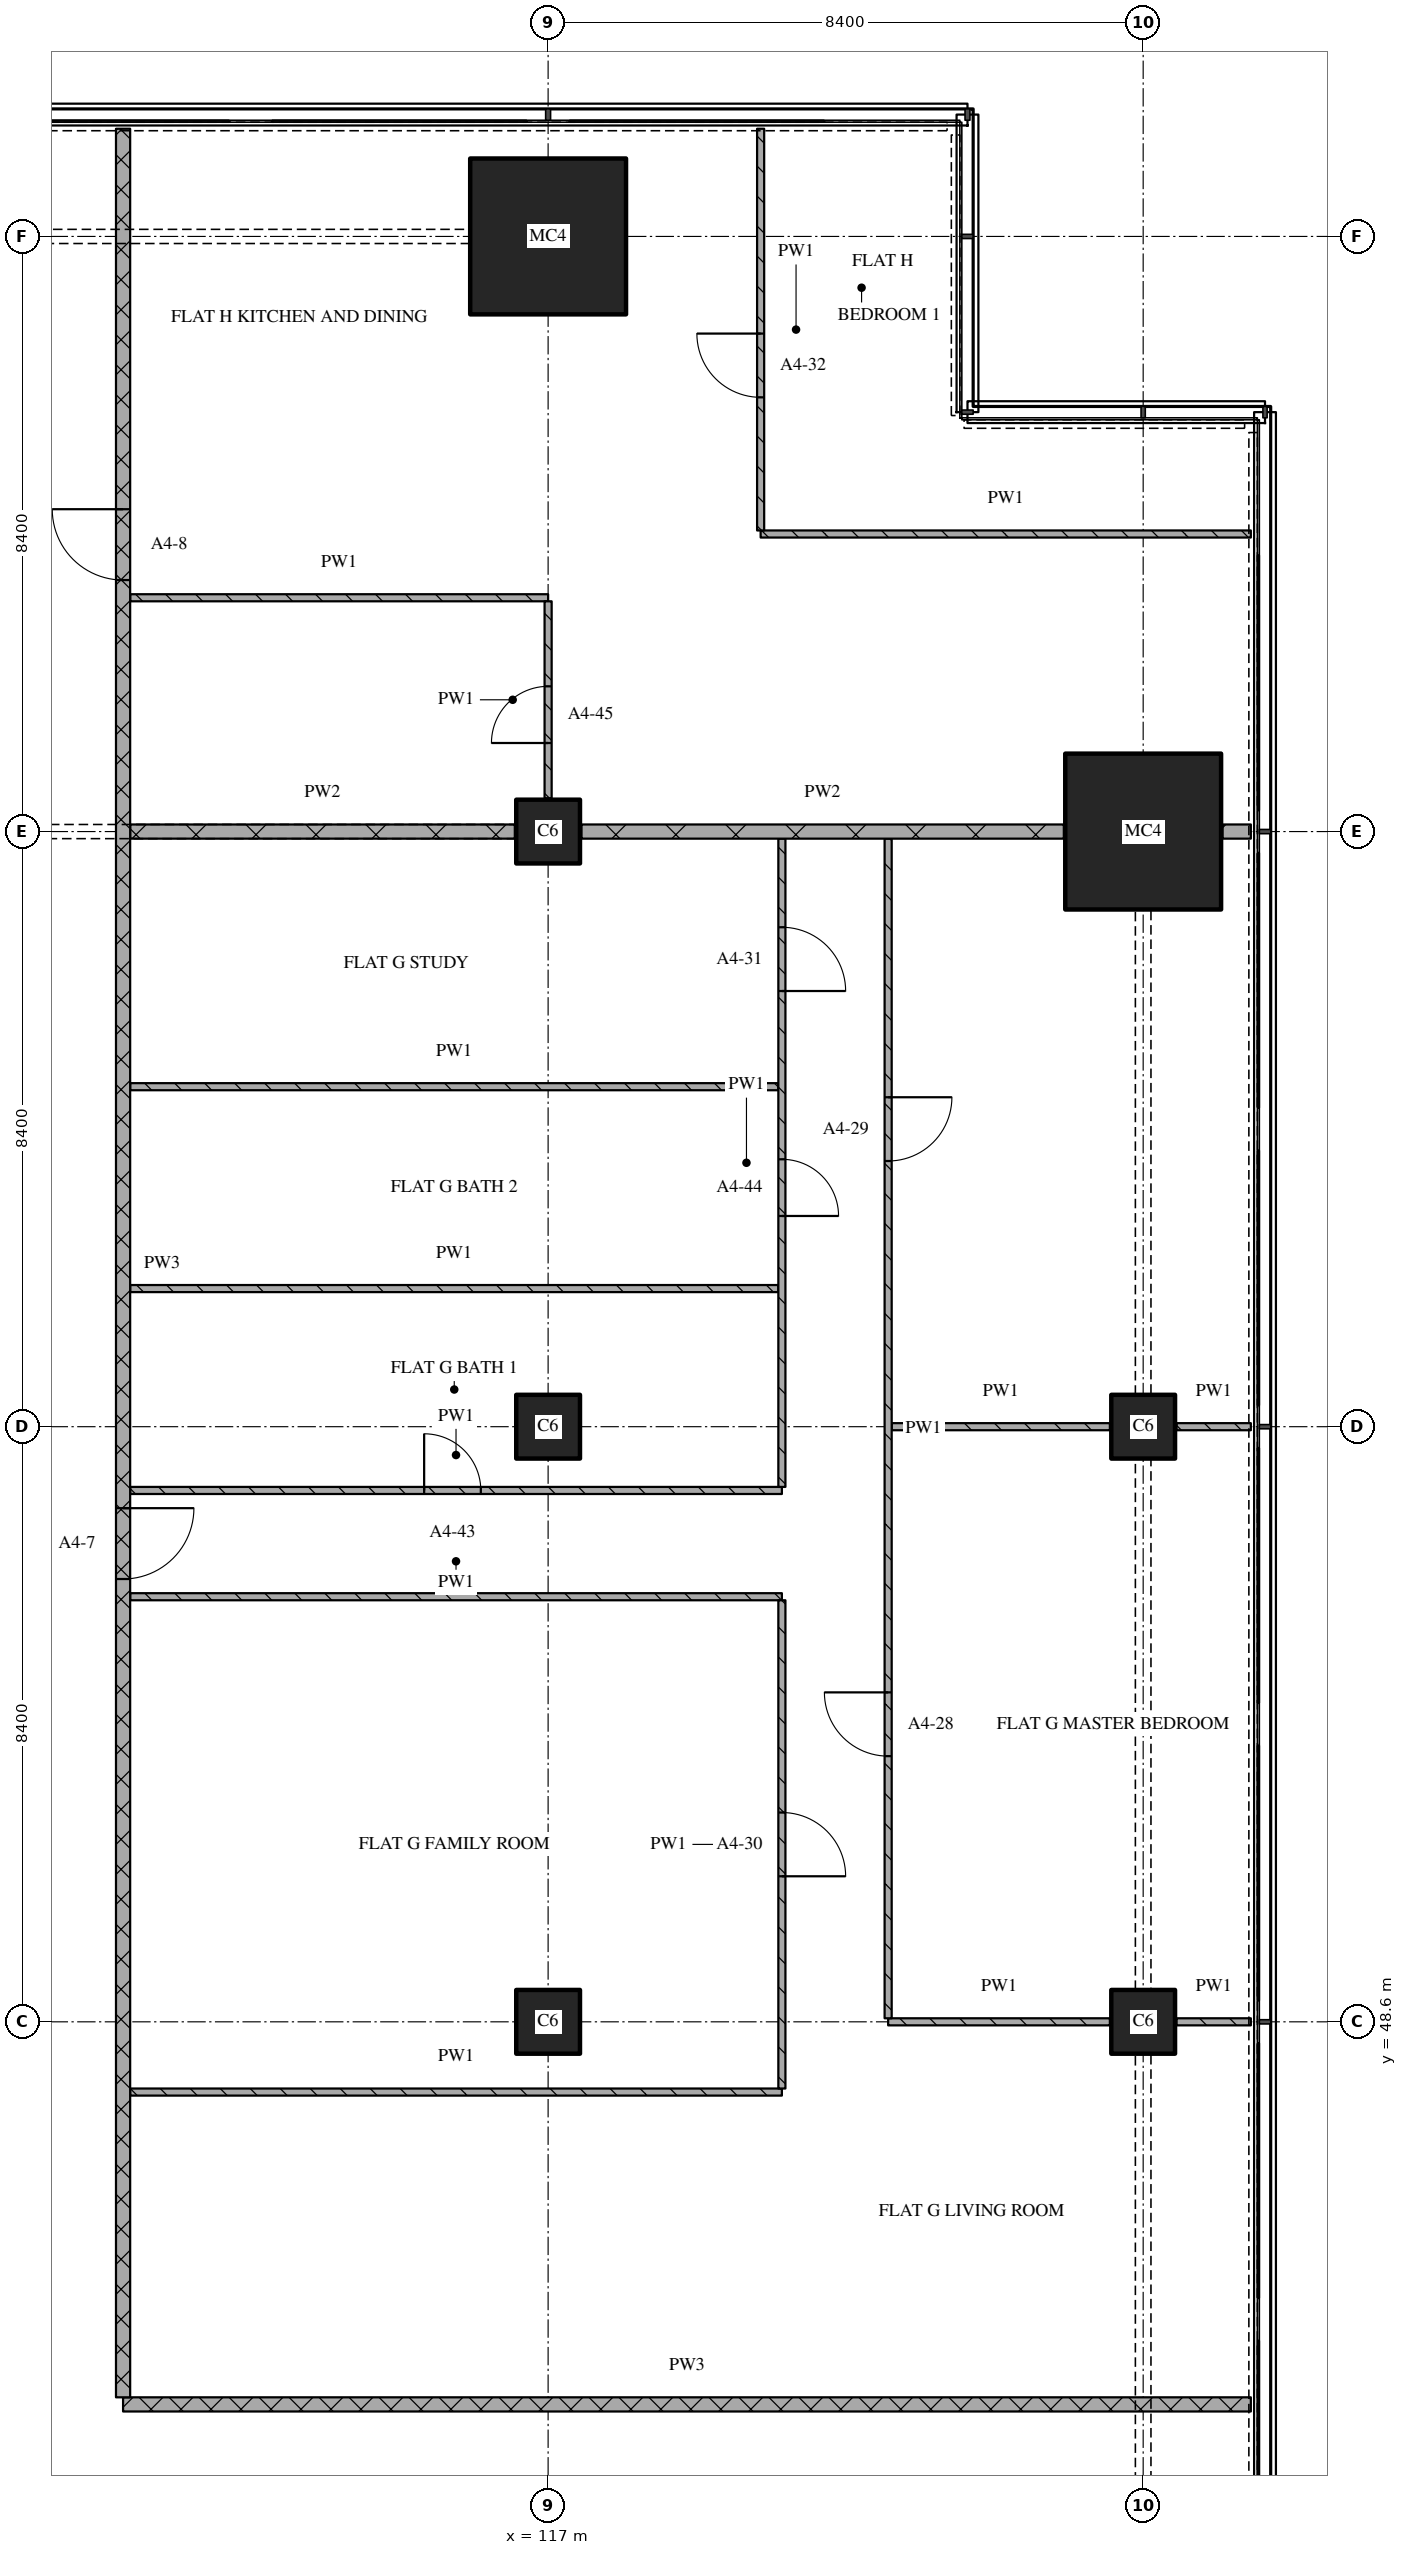
"""IFC4 building model, lengths in metres.
Left out: names, types, materials, properties, quantities, classifications, styles, units other than length and angle.
Written with IfcOpenShell. Run it as: python <this file> out.ifc"""

import sys

from ifc_helpers import new_model, si_unit, direction, frame, frame_2d, origin, origin_2d, place, context, subcontext, project, spatial, rectangle, extrude, element, fill, save


model = new_model("IFC4")
c1 = context("Model", 3, precision=1e-05, world=origin(), true_north=direction((0.0, 1.0)))
c2 = subcontext(c1, "Body", "Model", "MODEL_VIEW")
j1 = project(units=[si_unit("LENGTHUNIT", "METRE"), si_unit("PLANEANGLEUNIT", "RADIAN")], contexts=[c1])
p1 = place(None, origin())
s1 = spatial("IfcSite", under=j1, at=p1, CompositionType="ELEMENT")
p2 = place(p1, origin())
s2 = spatial("IfcBuilding", under=s1, at=p2, CompositionType="ELEMENT")
p3 = place(p2, frame((0.0, 0.0, 69.6)))
s3 = spatial("IfcBuildingStorey", under=s2, at=p3, CompositionType="ELEMENT", Elevation=69.6)
for number, where, z_axis, x_axis in (
    (1, (117.0, 48.6, 0.0), (0.0, 0.0, 1.0), (1.0, 0.0, 0.0)),
    (2, (117.0, 57.0, 0.0), (0.0, 0.0, 1.0), (1.0, 0.0, 0.0)),
    (3, (117.0, 65.4, 0.0), (0.0, 0.0, 1.0), (1.0, 0.0, 0.0)),
):
    element("IfcColumn", number, at=place(p3, frame(where, z_axis=z_axis, x_axis=x_axis)), inside=s3, PredefinedType="COLUMN", context=c2, shape_type="SweptSolid", body=[
        extrude(rectangle(XDim=0.9, YDim=0.9, at=origin_2d()), origin(), (0.0, 0.0, 1.0), 3.6),
    ])
p4 = place(p3, frame((117.0, 73.8, 0.0), z_axis=(0.0, 0.0, 1.0), x_axis=(1.0, 0.0, 0.0)))
e4 = element("IfcColumn", 4, at=p4, inside=s3, PredefinedType="COLUMN", context=c2, shape_type="SweptSolid", body=[
    extrude(rectangle(XDim=2.2, YDim=2.2, at=origin_2d()), origin(), (0.0, 0.0, 1.0), 3.6),
])
for number, where, z_axis, x_axis in (
    (5, (125.4, 48.6, 0.0), (0.0, 0.0, 1.0), (1.0, 0.0, 0.0)),
    (6, (125.4, 57.0, 0.0), (0.0, 0.0, 1.0), (1.0, 0.0, 0.0)),
):
    element("IfcColumn", number, at=place(p3, frame(where, z_axis=z_axis, x_axis=x_axis)), inside=s3, PredefinedType="COLUMN", context=c2, shape_type="SweptSolid", body=[
        extrude(rectangle(XDim=0.9, YDim=0.9, at=origin_2d()), origin(), (0.0, 0.0, 1.0), 3.6),
    ])
p5 = place(p3, frame((125.4, 65.4, 0.0), z_axis=(0.0, 0.0, 1.0), x_axis=(1.0, 0.0, 0.0)))
e7 = element("IfcColumn", 7, at=p5, inside=s3, PredefinedType="COLUMN", context=c2, shape_type="SweptSolid", body=[
    extrude(rectangle(XDim=2.2, YDim=2.2, at=origin_2d()), origin(), (0.0, 0.0, 1.0), 3.6),
])
p6 = place(p3, frame((111.0, 43.2, 0.0), z_axis=(0.0, 0.0, 1.0), x_axis=(1.0, 0.0, 0.0)))
e8 = element("IfcWall", 8, at=p6, inside=s3, PredefinedType="PARTITIONING", context=c2, shape_type="SweptSolid", body=[
    extrude(rectangle(XDim=15.92, YDim=0.2, at=frame_2d((7.96, 0.0))), origin(), (0.0, 0.0, 1.0), 3.32),
])
p7 = place(p3, frame((111.1, 47.609, 0.0), z_axis=(0.0, 0.0, 1.0), x_axis=(1.0, 0.0, 0.0)))
e9 = element("IfcWall", 9, at=p7, inside=s3, PredefinedType="PARTITIONING", context=c2, shape_type="SweptSolid", body=[
    extrude(rectangle(XDim=9.2, YDim=0.1, at=frame_2d((4.6, 0.0))), origin(), (0.0, 0.0, 1.0), 3.32),
])
p8 = place(p3, frame((121.8, 48.6, 0.0), z_axis=(0.0, 0.0, 1.0), x_axis=(1.0, 0.0, 0.0)))
e10 = element("IfcWall", 10, at=p8, inside=s3, PredefinedType="PARTITIONING", context=c2, shape_type="SweptSolid", body=[
    extrude(rectangle(XDim=3.13, YDim=0.1, at=frame_2d((1.565, 0.0))), origin(), (0.0, 0.0, 1.0), 3.32),
])
p9 = place(p3, frame((125.87, 48.6, 0.0), z_axis=(0.0, 0.0, 1.0), x_axis=(1.0, 0.0, 0.0)))
e11 = element("IfcWall", 11, at=p9, inside=s3, PredefinedType="PARTITIONING", context=c2, shape_type="SweptSolid", body=[
    extrude(rectangle(XDim=1.05, YDim=0.1, at=frame_2d((0.525, 0.0))), origin(), (0.0, 0.0, 1.0), 3.32),
])
p10 = place(p3, frame((111.1, 54.6, 0.0), z_axis=(0.0, 0.0, 1.0), x_axis=(1.0, 0.0, 0.0)))
e12 = element("IfcWall", 12, at=p10, inside=s3, PredefinedType="PARTITIONING", context=c2, shape_type="SweptSolid", body=[
    extrude(rectangle(XDim=9.2, YDim=0.1, at=frame_2d((4.6, 0.0))), origin(), (0.0, 0.0, 1.0), 3.32),
])
p11 = place(p3, frame((111.1, 56.1, 0.0), z_axis=(0.0, 0.0, 1.0), x_axis=(1.0, 0.0, 0.0)))
e13 = element("IfcWall", 13, at=p11, inside=s3, PredefinedType="PARTITIONING", context=c2, shape_type="SweptSolid", body=[
    extrude(rectangle(XDim=9.2, YDim=0.1, at=frame_2d((4.6, 0.0))), origin(), (0.0, 0.0, 1.0), 3.32),
])
p12 = place(p11, frame((4.15, 0.0, 0.0)))
e14 = element("IfcOpeningElement", 14, at=p12, cuts=e13, PredefinedType="OPENING", context=c2, shape_type="SweptSolid", body=[
    extrude(rectangle(XDim=0.8, YDim=2.1, at=frame_2d((0.4, 1.05))), frame((0.0, 0.06, 0.0), z_axis=(0.0, -1.0, 0.0), x_axis=(1.0, 0.0, 0.0)), (0.0, 0.0, 1.0), 0.12),
])
p13 = place(p3, frame((121.85, 57.0, 0.0), z_axis=(0.0, 0.0, 1.0), x_axis=(1.0, 0.0, 0.0)))
e15 = element("IfcWall", 15, at=p13, inside=s3, PredefinedType="PARTITIONING", context=c2, shape_type="SweptSolid", body=[
    extrude(rectangle(XDim=3.08, YDim=0.1, at=frame_2d((1.54, 0.0))), origin(), (0.0, 0.0, 1.0), 3.32),
])
p14 = place(p3, frame((125.87, 57.0, 0.0), z_axis=(0.0, 0.0, 1.0), x_axis=(1.0, 0.0, 0.0)))
e16 = element("IfcWall", 16, at=p14, inside=s3, PredefinedType="PARTITIONING", context=c2, shape_type="SweptSolid", body=[
    extrude(rectangle(XDim=1.05, YDim=0.1, at=frame_2d((0.525, 0.0))), origin(), (0.0, 0.0, 1.0), 3.32),
])
for number, where, z_axis, x_axis in (
    (17, (111.1, 58.949, 0.0), (0.0, 0.0, 1.0), (1.0, 0.0, 0.0)),
    (18, (111.1, 61.799, 0.0), (0.0, 0.0, 1.0), (1.0, 0.0, 0.0)),
):
    element("IfcWall", number, at=place(p3, frame(where, z_axis=z_axis, x_axis=x_axis)), inside=s3, PredefinedType="PARTITIONING", context=c2, shape_type="SweptSolid", body=[
        extrude(rectangle(XDim=9.15, YDim=0.1, at=frame_2d((4.575, 0.0))), origin(), (0.0, 0.0, 1.0), 3.32),
    ])
p15 = place(p3, frame((111.1, 65.4, 0.0), z_axis=(0.0, 0.0, 1.0), x_axis=(1.0, 0.0, 0.0)))
e19 = element("IfcWall", 19, at=p15, inside=s3, PredefinedType="PARTITIONING", context=c2, shape_type="SweptSolid", body=[
    extrude(rectangle(XDim=5.43, YDim=0.2, at=frame_2d((2.715, 0.0))), origin(), (0.0, 0.0, 1.0), 2.82),
])
p16 = place(p3, frame((117.47, 65.4, 0.0), z_axis=(0.0, 0.0, 1.0), x_axis=(1.0, 0.0, 0.0)))
e20 = element("IfcWall", 20, at=p16, inside=s3, PredefinedType="PARTITIONING", context=c2, shape_type="SweptSolid", body=[
    extrude(rectangle(XDim=6.81, YDim=0.2, at=frame_2d((3.405, 0.0))), origin(), (0.0, 0.0, 1.0), 3.32),
])
p17 = place(p3, frame((126.52, 65.4, 0.0), z_axis=(0.0, 0.0, 1.0), x_axis=(1.0, 0.0, 0.0)))
e21 = element("IfcWall", 21, at=p17, inside=s3, PredefinedType="PARTITIONING", context=c2, shape_type="SweptSolid", body=[
    extrude(rectangle(XDim=0.4, YDim=0.2, at=frame_2d((0.2, 0.0))), origin(), (0.0, 0.0, 1.0), 3.32),
])
p18 = place(p3, frame((111.1, 68.7, 0.0), z_axis=(0.0, 0.0, 1.0), x_axis=(1.0, 0.0, 0.0)))
e22 = element("IfcWall", 22, at=p18, inside=s3, PredefinedType="PARTITIONING", context=c2, shape_type="SweptSolid", body=[
    extrude(rectangle(XDim=5.9, YDim=0.1, at=frame_2d((2.95, 0.0))), origin(), (0.0, 0.0, 1.0), 3.32),
])
p19 = place(p3, frame((120.0, 69.6, 0.0), z_axis=(0.0, 0.0, 1.0), x_axis=(1.0, 0.0, 0.0)))
e23 = element("IfcWall", 23, at=p19, inside=s3, PredefinedType="PARTITIONING", context=c2, shape_type="SweptSolid", body=[
    extrude(rectangle(XDim=6.92, YDim=0.1, at=frame_2d((3.46, 0.0))), origin(), (0.0, 0.0, 1.0), 3.32),
])
p20 = place(p3, frame((111.0, 75.32, 0.0), z_axis=(0.0, 0.0, 1.0), x_axis=(0.0, -1.0, 0.0)))
e24 = element("IfcWall", 24, at=p20, inside=s3, PredefinedType="PARTITIONING", context=c2, shape_type="SweptSolid", body=[
    extrude(rectangle(XDim=32.02, YDim=0.2, at=frame_2d((16.01, 0.0))), origin(), (0.0, 0.0, 1.0), 3.32),
])
p21 = place(p20, frame((5.37, 0.0, 0.0)))
e25 = element("IfcOpeningElement", 25, at=p21, cuts=e24, PredefinedType="OPENING", context=c2, shape_type="SweptSolid", body=[
    extrude(rectangle(XDim=1.0, YDim=2.1, at=frame_2d((0.5, 1.05))), frame((0.0, 0.11, 0.0), z_axis=(0.0, -1.0, 0.0), x_axis=(1.0, 0.0, 0.0)), (0.0, 0.0, 1.0), 0.22),
])
p22 = place(p20, frame((19.47, 0.0, 0.0)))
e26 = element("IfcOpeningElement", 26, at=p22, cuts=e24, PredefinedType="OPENING", context=c2, shape_type="SweptSolid", body=[
    extrude(rectangle(XDim=1.0, YDim=2.1, at=frame_2d((0.5, 1.05))), frame((0.0, 0.11, 0.0), z_axis=(0.0, -1.0, 0.0), x_axis=(1.0, 0.0, 0.0)), (0.0, 0.0, 1.0), 0.22),
])
p23 = place(p3, frame((117.0, 65.87, 0.0), z_axis=(0.0, 0.0, 1.0), x_axis=(0.0, 1.0, 0.0)))
e27 = element("IfcWall", 27, at=p23, inside=s3, PredefinedType="PARTITIONING", context=c2, shape_type="SweptSolid", body=[
    extrude(rectangle(XDim=2.78, YDim=0.1, at=frame_2d((1.39, 0.0))), origin(), (0.0, 0.0, 1.0), 3.32),
])
p24 = place(p23, frame((0.78, 0.0, 0.0)))
e28 = element("IfcOpeningElement", 28, at=p24, cuts=e27, PredefinedType="OPENING", context=c2, shape_type="SweptSolid", body=[
    extrude(rectangle(XDim=0.8, YDim=2.1, at=frame_2d((0.4, 1.05))), frame((0.0, 0.06, 0.0), z_axis=(0.0, -1.0, 0.0), x_axis=(1.0, 0.0, 0.0)), (0.0, 0.0, 1.0), 0.12),
])
p25 = place(p3, frame((120.0, 75.32, 0.0), z_axis=(0.0, 0.0, 1.0), x_axis=(0.0, -1.0, 0.0)))
e29 = element("IfcWall", 29, at=p25, inside=s3, PredefinedType="PARTITIONING", context=c2, shape_type="SweptSolid", body=[
    extrude(rectangle(XDim=5.67, YDim=0.1, at=frame_2d((2.835, 0.0))), origin(), (0.0, 0.0, 1.0), 3.32),
])
p26 = place(p25, frame((2.891, 0.0, 0.0)))
e30 = element("IfcOpeningElement", 30, at=p26, cuts=e29, PredefinedType="OPENING", context=c2, shape_type="SweptSolid", body=[
    extrude(rectangle(XDim=0.9, YDim=2.1, at=frame_2d((0.45, 1.05))), frame((0.0, 0.06, 0.0), z_axis=(0.0, -1.0, 0.0), x_axis=(1.0, 0.0, 0.0)), (0.0, 0.0, 1.0), 0.12),
])
p27 = place(p3, frame((120.3, 47.659, 0.0), z_axis=(0.0, 0.0, 1.0), x_axis=(0.0, 1.0, 0.0)))
e31 = element("IfcWall", 31, at=p27, inside=s3, PredefinedType="PARTITIONING", context=c2, shape_type="SweptSolid", body=[
    extrude(rectangle(XDim=6.891, YDim=0.1, at=frame_2d((3.446, 0.0))), origin(), (0.0, 0.0, 1.0), 3.32),
])
p28 = place(p27, frame((2.996, 0.0, 0.0)))
e32 = element("IfcOpeningElement", 32, at=p28, cuts=e31, PredefinedType="OPENING", context=c2, shape_type="SweptSolid", body=[
    extrude(rectangle(XDim=0.9, YDim=2.1, at=frame_2d((0.45, 1.05))), frame((0.0, 0.06, 0.0), z_axis=(0.0, -1.0, 0.0), x_axis=(1.0, 0.0, 0.0)), (0.0, 0.0, 1.0), 0.12),
])
p29 = place(p3, frame((120.3, 56.15, 0.0), z_axis=(0.0, 0.0, 1.0), x_axis=(0.0, 1.0, 0.0)))
e33 = element("IfcWall", 33, at=p29, inside=s3, PredefinedType="PARTITIONING", context=c2, shape_type="SweptSolid", body=[
    extrude(rectangle(XDim=9.15, YDim=0.1, at=frame_2d((4.575, 0.0))), origin(), (0.0, 0.0, 1.0), 3.32),
])
p30 = place(p29, frame((3.824, 0.0, 0.0)))
e34 = element("IfcOpeningElement", 34, at=p30, cuts=e33, PredefinedType="OPENING", context=c2, shape_type="SweptSolid", body=[
    extrude(rectangle(XDim=0.8, YDim=2.1, at=frame_2d((0.4, 1.05))), frame((0.0, 0.06, 0.0), z_axis=(0.0, -1.0, 0.0), x_axis=(1.0, 0.0, 0.0)), (0.0, 0.0, 1.0), 0.12),
])
p31 = place(p29, frame((7.0, 0.0, 0.0)))
e35 = element("IfcOpeningElement", 35, at=p31, cuts=e33, PredefinedType="OPENING", context=c2, shape_type="SweptSolid", body=[
    extrude(rectangle(XDim=0.9, YDim=2.1, at=frame_2d((0.45, 1.05))), frame((0.0, 0.06, 0.0), z_axis=(0.0, -1.0, 0.0), x_axis=(1.0, 0.0, 0.0)), (0.0, 0.0, 1.0), 0.12),
])
p32 = place(p3, frame((121.8, 65.3, 0.0), z_axis=(0.0, 0.0, 1.0), x_axis=(0.0, -1.0, 0.0)))
e36 = element("IfcWall", 36, at=p32, inside=s3, PredefinedType="PARTITIONING", context=c2, shape_type="SweptSolid", body=[
    extrude(rectangle(XDim=16.65, YDim=0.1, at=frame_2d((8.325, 0.0))), origin(), (0.0, 0.0, 1.0), 3.32),
])
p33 = place(p32, frame((3.65, 0.0, 0.0)))
e37 = element("IfcOpeningElement", 37, at=p33, cuts=e36, PredefinedType="OPENING", context=c2, shape_type="SweptSolid", body=[
    extrude(rectangle(XDim=0.9, YDim=2.1, at=frame_2d((0.45, 1.05))), frame((0.0, 0.06, 0.0), z_axis=(0.0, -1.0, 0.0), x_axis=(1.0, 0.0, 0.0)), (0.0, 0.0, 1.0), 0.12),
])
p34 = place(p32, frame((12.05, 0.0, 0.0)))
e38 = element("IfcOpeningElement", 38, at=p34, cuts=e36, PredefinedType="OPENING", context=c2, shape_type="SweptSolid", body=[
    extrude(rectangle(XDim=0.9, YDim=2.1, at=frame_2d((0.45, 1.05))), frame((0.0, 0.06, 0.0), z_axis=(0.0, -1.0, 0.0), x_axis=(1.0, 0.0, 0.0)), (0.0, 0.0, 1.0), 0.12),
])
p35 = place(p12, origin())
e39 = element("IfcDoor", 39, at=p35, inside=s3, OperationType="SINGLE_SWING_LEFT", PredefinedType="DOOR", context=c2, shape_type="SweptSolid", body=[
    extrude(rectangle(XDim=0.8, YDim=2.1, at=frame_2d((0.4, 1.05))), frame((0.0, 0.025, 0.0), z_axis=(0.0, -1.0, 0.0), x_axis=(1.0, 0.0, 0.0)), (0.0, 0.0, 1.0), 0.05),
])
fill(e14, e39)
p36 = place(p21, origin())
e40 = element("IfcDoor", 40, at=p36, inside=s3, OperationType="SINGLE_SWING_RIGHT", PredefinedType="DOOR", context=c2, shape_type="SweptSolid", body=[
    extrude(rectangle(XDim=1.0, YDim=2.1, at=frame_2d((0.5, 1.05))), frame((0.0, 0.025, 0.0), z_axis=(0.0, -1.0, 0.0), x_axis=(1.0, 0.0, 0.0)), (0.0, 0.0, 1.0), 0.05),
])
fill(e25, e40)
p37 = place(p22, origin())
e41 = element("IfcDoor", 41, at=p37, inside=s3, OperationType="SINGLE_SWING_LEFT", PredefinedType="DOOR", context=c2, shape_type="SweptSolid", body=[
    extrude(rectangle(XDim=1.0, YDim=2.1, at=frame_2d((0.5, 1.05))), frame((0.0, 0.025, 0.0), z_axis=(0.0, -1.0, 0.0), x_axis=(1.0, 0.0, 0.0)), (0.0, 0.0, 1.0), 0.05),
])
fill(e26, e41)
p38 = place(p24, origin())
e42 = element("IfcDoor", 42, at=p38, inside=s3, OperationType="SINGLE_SWING_LEFT", PredefinedType="DOOR", context=c2, shape_type="SweptSolid", body=[
    extrude(rectangle(XDim=0.8, YDim=2.1, at=frame_2d((0.4, 1.05))), frame((0.0, 0.025, 0.0), z_axis=(0.0, -1.0, 0.0), x_axis=(1.0, 0.0, 0.0)), (0.0, 0.0, 1.0), 0.05),
])
fill(e28, e42)
p39 = place(p26, origin())
e43 = element("IfcDoor", 43, at=p39, inside=s3, OperationType="SINGLE_SWING_RIGHT", PredefinedType="DOOR", context=c2, shape_type="SweptSolid", body=[
    extrude(rectangle(XDim=0.9, YDim=2.1, at=frame_2d((0.45, 1.05))), frame((0.0, 0.025, 0.0), z_axis=(0.0, -1.0, 0.0), x_axis=(1.0, 0.0, 0.0)), (0.0, 0.0, 1.0), 0.05),
])
fill(e30, e43)
p40 = place(p28, origin())
e44 = element("IfcDoor", 44, at=p40, inside=s3, OperationType="SINGLE_SWING_RIGHT", PredefinedType="DOOR", context=c2, shape_type="SweptSolid", body=[
    extrude(rectangle(XDim=0.9, YDim=2.1, at=frame_2d((0.45, 1.05))), frame((0.0, 0.025, 0.0), z_axis=(0.0, -1.0, 0.0), x_axis=(1.0, 0.0, 0.0)), (0.0, 0.0, 1.0), 0.05),
])
fill(e32, e44)
p41 = place(p30, origin())
e45 = element("IfcDoor", 45, at=p41, inside=s3, OperationType="SINGLE_SWING_RIGHT", PredefinedType="DOOR", context=c2, shape_type="SweptSolid", body=[
    extrude(rectangle(XDim=0.8, YDim=2.1, at=frame_2d((0.4, 1.05))), frame((0.0, 0.025, 0.0), z_axis=(0.0, -1.0, 0.0), x_axis=(1.0, 0.0, 0.0)), (0.0, 0.0, 1.0), 0.05),
])
fill(e34, e45)
p42 = place(p31, origin())
e46 = element("IfcDoor", 46, at=p42, inside=s3, OperationType="SINGLE_SWING_RIGHT", PredefinedType="DOOR", context=c2, shape_type="SweptSolid", body=[
    extrude(rectangle(XDim=0.9, YDim=2.1, at=frame_2d((0.45, 1.05))), frame((0.0, 0.025, 0.0), z_axis=(0.0, -1.0, 0.0), x_axis=(1.0, 0.0, 0.0)), (0.0, 0.0, 1.0), 0.05),
])
fill(e35, e46)
p43 = place(p33, origin())
e47 = element("IfcDoor", 47, at=p43, inside=s3, OperationType="SINGLE_SWING_LEFT", PredefinedType="DOOR", context=c2, shape_type="SweptSolid", body=[
    extrude(rectangle(XDim=0.9, YDim=2.1, at=frame_2d((0.45, 1.05))), frame((0.0, 0.025, 0.0), z_axis=(0.0, -1.0, 0.0), x_axis=(1.0, 0.0, 0.0)), (0.0, 0.0, 1.0), 0.05),
])
fill(e37, e47)
p44 = place(p34, origin())
e48 = element("IfcDoor", 48, at=p44, inside=s3, OperationType="SINGLE_SWING_RIGHT", PredefinedType="DOOR", context=c2, shape_type="SweptSolid", body=[
    extrude(rectangle(XDim=0.9, YDim=2.1, at=frame_2d((0.45, 1.05))), frame((0.0, 0.025, 0.0), z_axis=(0.0, -1.0, 0.0), x_axis=(1.0, 0.0, 0.0)), (0.0, 0.0, 1.0), 0.05),
])
fill(e38, e48)
save(model, sys.argv[1])
